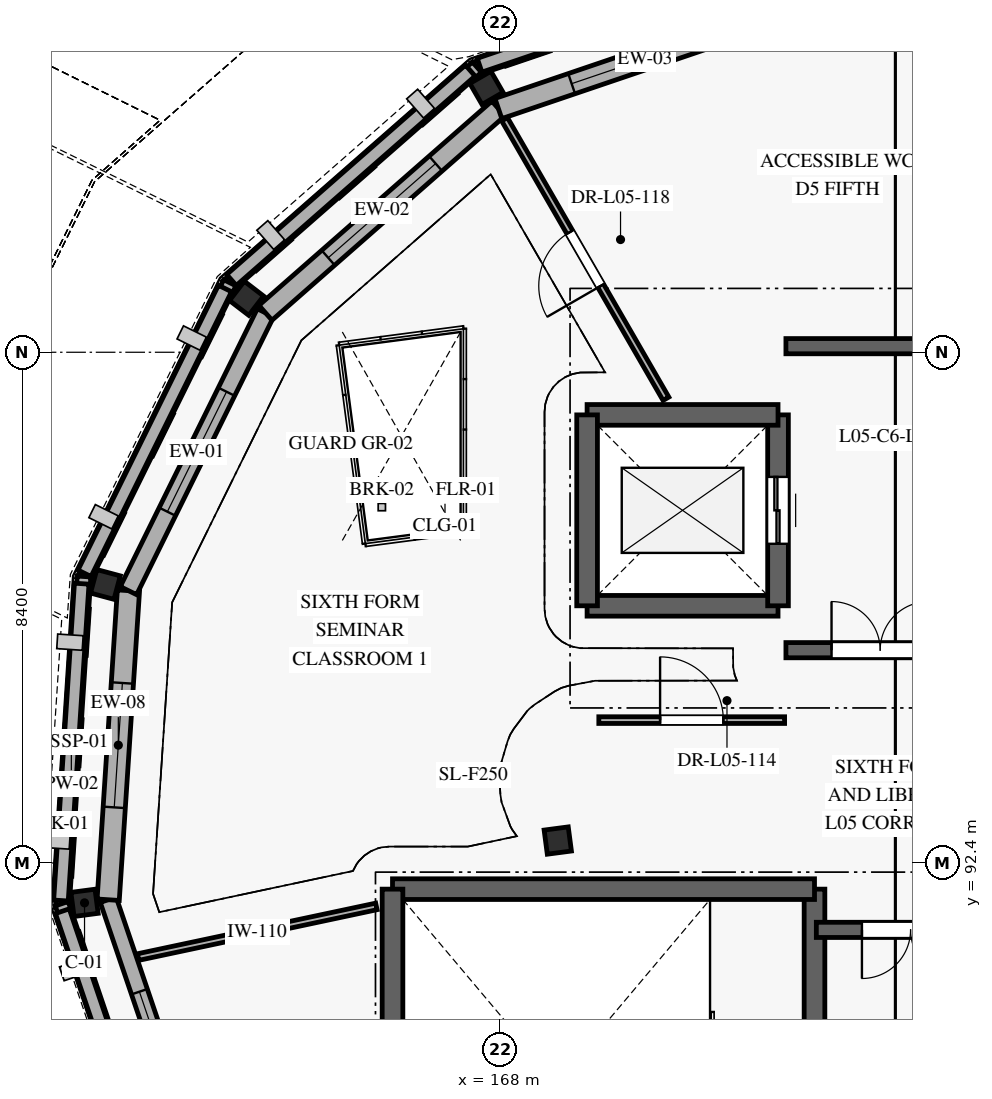
"""IFC4 building model, lengths in metres.
Left out: names, types, materials, properties, quantities, classifications, styles, units other than length and angle.
Written with IfcOpenShell. Run it as: python <this file> out.ifc"""

import sys

from ifc_helpers import new_model, si_unit, direction, frame, frame_2d, origin, origin_2d, place, context, subcontext, project, spatial, rectangle, extrude, element, fill, save


model = new_model("IFC4")
c1 = context("Model", 3, precision=1e-05, world=origin(), true_north=direction((0.0, 1.0)))
c2 = subcontext(c1, "Body", "Model", "MODEL_VIEW")
j1 = project(units=[si_unit("LENGTHUNIT", "METRE"), si_unit("PLANEANGLEUNIT", "RADIAN")], contexts=[c1])
p1 = place(None, origin())
s1 = spatial("IfcSite", under=j1, at=p1, CompositionType="ELEMENT")
p2 = place(p1, origin())
s2 = spatial("IfcBuilding", under=s1, at=p2, CompositionType="ELEMENT")
p3 = place(p2, frame((0.0, 0.0, 20.8)))
s3 = spatial("IfcBuildingStorey", under=s2, at=p3, CompositionType="ELEMENT", Elevation=20.8)
for number, where, z_axis, x_axis in (
    (1, (167.775, 105.148, 0.0), (0.0, 0.0, 1.0), (-0.866, -0.5, 0.0)),
    (2, (163.829, 101.688, 0.0), (0.0, 0.0, 1.0), (-0.609, -0.793, 0.0)),
    (3, (161.508, 96.981, 0.0), (0.0, 0.0, 1.0), (-0.259, -0.966, 0.0)),
    (4, (161.165, 91.744, 0.0), (0.0, 0.0, 1.0), (0.131, -0.991, 0.0)),
    (5, (168.948, 92.769, 0.0), (0.0, 0.0, 1.0), (-0.991, -0.131, 0.0)),
):
    element("IfcColumn", number, at=place(p3, frame(where, z_axis=z_axis, x_axis=x_axis)), inside=s3, PredefinedType="COLUMN", context=c2, shape_type="SweptSolid", body=[
        extrude(rectangle(XDim=0.4, YDim=0.4, at=origin_2d()), origin(), (0.0, 0.0, 1.0), 4.0),
    ])
p4 = place(p3, frame((163.192, 86.971, 0.0), z_axis=(0.0, 0.0, 1.0), x_axis=(-0.321398403796, 0.946944067006, 0.0)))
e6 = element("IfcWall", 6, at=p4, inside=s3, PredefinedType="SOLIDWALL", context=c2, shape_type="SweptSolid", body=[
    extrude(rectangle(XDim=5.095, YDim=0.275, at=frame_2d((2.547, 0.0))), origin(), (0.0, 0.0, 1.0), 3.74),
])
p5 = place(p4, frame((1.597, 0.0, 0.85)))
e7 = element("IfcOpeningElement", 7, at=p5, cuts=e6, PredefinedType="OPENING", context=c2, shape_type="SweptSolid", body=[
    extrude(rectangle(XDim=1.9, YDim=1.8, at=frame_2d((0.95, 0.9))), frame((0.0, 0.147, 0.0), z_axis=(0.0, -1.0, 0.0), x_axis=(1.0, 0.0, 0.0)), (0.0, 0.0, 1.0), 0.295),
])
p6 = place(p3, frame((161.554, 91.796, 0.0), z_axis=(0.0, 0.0, 1.0), x_axis=(0.065364406289, 0.99786146052, 0.0)))
e8 = element("IfcWall", 8, at=p6, inside=s3, PredefinedType="SOLIDWALL", context=c2, shape_type="SweptSolid", body=[
    extrude(rectangle(XDim=5.095, YDim=0.365, at=frame_2d((2.547, 0.0))), origin(), (0.0, 0.0, 1.0), 3.74),
])
p7 = place(p6, frame((1.522, 0.0, 0.85)))
e9 = element("IfcOpeningElement", 9, at=p7, cuts=e8, PredefinedType="OPENING", context=c2, shape_type="SweptSolid", body=[
    extrude(rectangle(XDim=2.05, YDim=1.8, at=frame_2d((1.025, 0.9))), frame((0.0, 0.192, 0.0), z_axis=(0.0, -1.0, 0.0), x_axis=(1.0, 0.0, 0.0)), (0.0, 0.0, 1.0), 0.385),
])
p8 = place(p3, frame((161.887, 96.879, 0.0), z_axis=(0.0, 0.0, 1.0), x_axis=(0.442261861213, 0.896885971635, 0.0)))
e10 = element("IfcWall", 10, at=p8, inside=s3, PredefinedType="SOLIDWALL", context=c2, shape_type="SweptSolid", body=[
    extrude(rectangle(XDim=5.095, YDim=0.3, at=frame_2d((2.548, 0.0))), origin(), (0.0, 0.0, 1.0), 3.74),
])
p9 = place(p8, frame((1.448, 0.0, 0.85)))
e11 = element("IfcOpeningElement", 11, at=p9, cuts=e10, PredefinedType="OPENING", context=c2, shape_type="SweptSolid", body=[
    extrude(rectangle(XDim=2.2, YDim=1.8, at=frame_2d((1.1, 0.9))), frame((0.0, 0.16, 0.0), z_axis=(0.0, -1.0, 0.0), x_axis=(1.0, 0.0, 0.0)), (0.0, 0.0, 1.0), 0.32),
])
p10 = place(p3, frame((164.141, 101.449, 0.0), z_axis=(0.0, 0.0, 1.0), x_axis=(0.751857877577, 0.659325209533, 0.0)))
e12 = element("IfcWall", 12, at=p10, inside=s3, PredefinedType="SOLIDWALL", context=c2, shape_type="SweptSolid", body=[
    extrude(rectangle(XDim=5.095, YDim=0.325, at=frame_2d((2.547, 0.0))), origin(), (0.0, 0.0, 1.0), 3.74),
])
p11 = place(p10, frame((1.372, 0.0, 0.85)))
e13 = element("IfcOpeningElement", 13, at=p11, cuts=e12, PredefinedType="OPENING", context=c2, shape_type="SweptSolid", body=[
    extrude(rectangle(XDim=2.35, YDim=1.8, at=frame_2d((1.175, 0.9))), frame((0.0, 0.172, 0.0), z_axis=(0.0, -1.0, 0.0), x_axis=(1.0, 0.0, 0.0)), (0.0, 0.0, 1.0), 0.345),
])
p12 = place(p3, frame((167.971, 104.808, 0.0), z_axis=(0.0, 0.0, 1.0), x_axis=(0.946944067006, 0.321398403796, 0.0)))
e14 = element("IfcWall", 14, at=p12, inside=s3, PredefinedType="SOLIDWALL", context=c2, shape_type="SweptSolid", body=[
    extrude(rectangle(XDim=5.095, YDim=0.35, at=frame_2d((2.547, 0.0))), origin(), (0.0, 0.0, 1.0), 3.74),
])
p13 = place(p12, frame((1.272, 0.0, 0.85)))
e15 = element("IfcOpeningElement", 15, at=p13, cuts=e14, PredefinedType="OPENING", context=c2, shape_type="SweptSolid", body=[
    extrude(rectangle(XDim=2.55, YDim=1.8, at=frame_2d((1.275, 0.9))), frame((0.0, 0.185, 0.0), z_axis=(0.0, -1.0, 0.0), x_axis=(1.0, 0.0, 0.0)), (0.0, 0.0, 1.0), 0.37),
])
p14 = place(p3, frame((172.73, 107.21, 0.0), z_axis=(0.0, 0.0, 1.0), x_axis=(-0.946943969259, -0.321398691789, 0.0)))
e16 = element("IfcWall", 16, at=p14, inside=s3, PredefinedType="ELEMENTEDWALL", context=c2, shape_type="SweptSolid", body=[
    extrude(rectangle(XDim=5.462, YDim=0.225, at=frame_2d((2.731, 0.0))), origin(), (0.0, 0.0, 1.0), 1.09),
])
p15 = place(p3, frame((168.78, 105.869, 1.09), z_axis=(0.0, 0.0, 1.0), x_axis=(-0.946868666253, -0.321620473335, 0.0)))
e17 = element("IfcWall", 17, at=p15, inside=s3, PredefinedType="ELEMENTEDWALL", context=c2, shape_type="SweptSolid", body=[
    extrude(rectangle(XDim=0.76, YDim=0.245, at=frame_2d((0.38, 0.0))), origin(), (0.0, 0.0, 1.0), 2.65),
])
p16 = place(p3, frame((167.619, 105.489, 0.0), z_axis=(0.0, 0.0, 1.0), x_axis=(-0.751850842434, -0.659333231933, 0.0)))
e18 = element("IfcWall", 18, at=p16, inside=s3, PredefinedType="ELEMENTEDWALL", context=c2, shape_type="SweptSolid", body=[
    extrude(rectangle(XDim=5.462, YDim=0.225, at=frame_2d((2.731, 0.0))), origin(), (0.0, 0.0, 1.0), 1.09),
])
p17 = place(p3, frame((167.22, 105.139, 1.09), z_axis=(0.0, 0.0, 1.0), x_axis=(-0.751840109951, -0.659345470196, 0.0)))
e19 = element("IfcWall", 19, at=p17, inside=s3, PredefinedType="ELEMENTEDWALL", context=c2, shape_type="SweptSolid", body=[
    extrude(rectangle(XDim=0.76, YDim=0.245, at=frame_2d((0.38, 0.0))), origin(), (0.0, 0.0, 1.0), 2.65),
])
p18 = place(p3, frame((165.851, 103.939, 1.09), z_axis=(0.0, 0.0, 1.0), x_axis=(-0.751859704857, -0.659323125798, 0.0)))
e20 = element("IfcWall", 20, at=p18, inside=s3, PredefinedType="ELEMENTEDWALL", context=c2, shape_type="SweptSolid", body=[
    extrude(rectangle(XDim=0.76, YDim=0.245, at=frame_2d((0.38, 0.0))), origin(), (0.0, 0.0, 1.0), 2.65),
])
p19 = place(p3, frame((164.482, 102.738, 1.09), z_axis=(0.0, 0.0, 1.0), x_axis=(-0.751700438565, -0.659504701015, 0.0)))
e21 = element("IfcWall", 21, at=p19, inside=s3, PredefinedType="ELEMENTEDWALL", context=c2, shape_type="SweptSolid", body=[
    extrude(rectangle(XDim=0.76, YDim=0.245, at=frame_2d((0.38, 0.0))), origin(), (0.0, 0.0, 1.0), 2.65),
])
p20 = place(p3, frame((163.554, 101.943, 0.0), z_axis=(0.0, 0.0, 1.0), x_axis=(-0.442290514216, -0.896871842035, 0.0)))
e22 = element("IfcWall", 22, at=p20, inside=s3, PredefinedType="ELEMENTEDWALL", context=c2, shape_type="SweptSolid", body=[
    extrude(rectangle(XDim=5.462, YDim=0.225, at=frame_2d((2.731, 0.0))), origin(), (0.0, 0.0, 1.0), 1.09),
])
p21 = place(p3, frame((163.32, 101.467, 1.09), z_axis=(0.0, 0.0, 1.0), x_axis=(-0.442451801258, -0.896792285629, 0.0)))
e23 = element("IfcWall", 23, at=p21, inside=s3, PredefinedType="ELEMENTEDWALL", context=c2, shape_type="SweptSolid", body=[
    extrude(rectangle(XDim=0.76, YDim=0.245, at=frame_2d((0.38, 0.0))), origin(), (0.0, 0.0, 1.0), 2.65),
])
for number, where, z_axis, x_axis in (
    (24, (162.514, 99.834, 1.09), (0.0, 0.0, 1.0), (-0.442, -0.897, 0.0)),
    (25, (161.709, 98.201, 1.09), (0.0, 0.0, 1.0), (-0.442, -0.897, 0.0)),
):
    element("IfcWall", number, at=place(p3, frame(where, z_axis=z_axis, x_axis=x_axis)), inside=s3, PredefinedType="ELEMENTEDWALL", context=c2, shape_type="SweptSolid", body=[
        extrude(rectangle(XDim=0.76, YDim=0.245, at=frame_2d((0.38, 0.0))), origin(), (0.0, 0.0, 1.0), 2.65),
    ])
p22 = place(p3, frame((161.156, 97.112, 0.0), z_axis=(0.0, 0.0, 1.0), x_axis=(-0.065385822726, -0.997860057416, 0.0)))
e26 = element("IfcWall", 26, at=p22, inside=s3, PredefinedType="ELEMENTEDWALL", context=c2, shape_type="SweptSolid", body=[
    extrude(rectangle(XDim=5.463, YDim=0.225, at=frame_2d((2.731, 0.0))), origin(), (0.0, 0.0, 1.0), 1.09),
])
p23 = place(p3, frame((161.122, 96.583, 1.09), z_axis=(0.0, 0.0, 1.0), x_axis=(-0.065197327118, -0.997872390908, 0.0)))
e27 = element("IfcWall", 27, at=p23, inside=s3, PredefinedType="ELEMENTEDWALL", context=c2, shape_type="SweptSolid", body=[
    extrude(rectangle(XDim=0.76, YDim=0.245, at=frame_2d((0.38, 0.0))), origin(), (0.0, 0.0, 1.0), 2.65),
])
for number, where, z_axis, x_axis in (
    (28, (161.003, 94.765, 1.09), (0.0, 0.0, 1.0), (-0.065, -0.998, 0.0)),
    (29, (160.884, 92.948, 1.09), (0.0, 0.0, 1.0), (-0.066, -0.998, 0.0)),
):
    element("IfcWall", number, at=place(p3, frame(where, z_axis=z_axis, x_axis=x_axis)), inside=s3, PredefinedType="ELEMENTEDWALL", context=c2, shape_type="SweptSolid", body=[
        extrude(rectangle(XDim=0.76, YDim=0.245, at=frame_2d((0.38, 0.0))), origin(), (0.0, 0.0, 1.0), 2.65),
    ])
p24 = place(p3, frame((160.79, 91.73, 0.0), z_axis=(0.0, 0.0, 1.0), x_axis=(0.321398691789, -0.946943969259, 0.0)))
e30 = element("IfcWall", 30, at=p24, inside=s3, PredefinedType="ELEMENTEDWALL", context=c2, shape_type="SweptSolid", body=[
    extrude(rectangle(XDim=5.462, YDim=0.225, at=frame_2d((2.731, 0.0))), origin(), (0.0, 0.0, 1.0), 1.09),
])
p25 = place(p3, frame((160.961, 91.228, 1.09), z_axis=(0.0, 0.0, 1.0), x_axis=(0.321522655386, -0.946901886192, 0.0)))
e31 = element("IfcWall", 31, at=p25, inside=s3, PredefinedType="ELEMENTEDWALL", context=c2, shape_type="SweptSolid", body=[
    extrude(rectangle(XDim=0.76, YDim=0.245, at=frame_2d((0.38, 0.0))), origin(), (0.0, 0.0, 1.0), 2.65),
])
p26 = place(p3, frame((172.607, 107.2, 4.0), z_axis=(0.0, 0.0, 1.0), x_axis=(-0.946929922709, -0.321440074474, 0.0)))
e32 = element("IfcWall", 32, at=p26, inside=s3, PredefinedType="PARAPET", context=c2, shape_type="SweptSolid", body=[
    extrude(rectangle(XDim=5.222, YDim=0.24, at=frame_2d((2.611, 0.0))), origin(), (0.0, 0.0, 1.0), 1.12),
])
p27 = place(p3, frame((167.509, 105.433, 4.0), z_axis=(0.0, 0.0, 1.0), x_axis=(-0.751826191912, -0.659361340355, 0.0)))
e33 = element("IfcWall", 33, at=p27, inside=s3, PredefinedType="PARAPET", context=c2, shape_type="SweptSolid", body=[
    extrude(rectangle(XDim=5.223, YDim=0.24, at=frame_2d((2.611, 0.0))), origin(), (0.0, 0.0, 1.0), 1.12),
])
p28 = place(p3, frame((163.475, 101.849, 4.0), z_axis=(0.0, 0.0, 1.0), x_axis=(-0.442326480827, -0.896854104277, 0.0)))
e34 = element("IfcWall", 34, at=p28, inside=s3, PredefinedType="PARAPET", context=c2, shape_type="SweptSolid", body=[
    extrude(rectangle(XDim=5.222, YDim=0.24, at=frame_2d((2.611, 0.0))), origin(), (0.0, 0.0, 1.0), 1.12),
])
p29 = place(p3, frame((161.119, 96.994, 4.0), z_axis=(0.0, 0.0, 1.0), x_axis=(-0.065398904758, -0.997859200116, 0.0)))
e35 = element("IfcWall", 35, at=p29, inside=s3, PredefinedType="PARAPET", context=c2, shape_type="SweptSolid", body=[
    extrude(rectangle(XDim=5.223, YDim=0.24, at=frame_2d((2.611, 0.0))), origin(), (0.0, 0.0, 1.0), 1.12),
])
p30 = place(p3, frame((160.8, 91.607, 4.0), z_axis=(0.0, 0.0, 1.0), x_axis=(0.321440074474, -0.946929922709, 0.0)))
e36 = element("IfcWall", 36, at=p30, inside=s3, PredefinedType="PARAPET", context=c2, shape_type="SweptSolid", body=[
    extrude(rectangle(XDim=5.222, YDim=0.24, at=frame_2d((2.611, 0.0))), origin(), (0.0, 0.0, 1.0), 1.12),
])
p31 = place(p3, frame((173.17, 85.63, 0.0), z_axis=(0.0, 0.0, 1.0), x_axis=(0.0, 1.0, 0.0)))
e37 = element("IfcWall", 37, at=p31, inside=s3, PredefinedType="SHEAR", context=c2, shape_type="SweptSolid", body=[
    extrude(rectangle(XDim=6.34, YDim=0.34, at=frame_2d((3.17, 0.0))), origin(), (0.0, 0.0, 1.0), 3.75),
])
p32 = place(p31, frame((2.57, 0.0, 0.0)))
e38 = element("IfcOpeningElement", 38, at=p32, cuts=e37, PredefinedType="OPENING", context=c2, shape_type="SweptSolid", body=[
    extrude(rectangle(XDim=1.2, YDim=2.1, at=frame_2d((0.6, 1.05))), frame((0.0, 0.18, 0.0), z_axis=(0.0, -1.0, 0.0), x_axis=(1.0, 0.0, 0.0)), (0.0, 0.0, 1.0), 0.36),
])
p33 = place(p3, frame((173.17, 91.97, 0.0), z_axis=(0.0, 0.0, 1.0), x_axis=(-1.0, 0.0, 0.0)))
e39 = element("IfcWall", 39, at=p33, inside=s3, PredefinedType="SHEAR", context=c2, shape_type="SweptSolid", body=[
    extrude(rectangle(XDim=6.94, YDim=0.34, at=frame_2d((3.47, 0.0))), origin(), (0.0, 0.0, 1.0), 3.75),
])
p34 = place(p3, frame((166.23, 91.97, 0.0), z_axis=(0.0, 0.0, 1.0), x_axis=(0.0, -1.0, 0.0)))
e40 = element("IfcWall", 40, at=p34, inside=s3, PredefinedType="SHEAR", context=c2, shape_type="SweptSolid", body=[
    extrude(rectangle(XDim=6.34, YDim=0.34, at=frame_2d((3.17, 0.0))), origin(), (0.0, 0.0, 1.0), 3.75),
])
p35 = place(p3, frame((176.3, 91.3, 0.0), z_axis=(0.0, 0.0, 1.0), x_axis=(-1.0, 0.0, 0.0)))
e41 = element("IfcWall", 41, at=p35, inside=s3, PredefinedType="SHEAR", context=c2, shape_type="SweptSolid", body=[
    extrude(rectangle(XDim=3.1, YDim=0.25, at=frame_2d((1.55, 0.0))), origin(), (0.0, 0.0, 1.0), 3.75),
])
p36 = place(p35, frame((0.75, 0.0, 0.0)))
e42 = element("IfcOpeningElement", 42, at=p36, cuts=e41, PredefinedType="OPENING", context=c2, shape_type="SweptSolid", body=[
    extrude(rectangle(XDim=1.6, YDim=2.15, at=frame_2d((0.8, 1.075))), frame((0.0, 0.135, 0.0), z_axis=(0.0, -1.0, 0.0), x_axis=(1.0, 0.0, 0.0)), (0.0, 0.0, 1.0), 0.27),
])
p37 = place(p3, frame((169.43, 96.63, 0.0), z_axis=(0.0, 0.0, 1.0), x_axis=(1.0, 0.0, 0.0)))
e43 = element("IfcWall", 43, at=p37, inside=s3, PredefinedType="SHEAR", context=c2, shape_type="SweptSolid", body=[
    extrude(rectangle(XDim=3.14, YDim=0.34, at=frame_2d((1.57, 0.0))), origin(), (0.0, 0.0, 1.0), 3.75),
])
p38 = place(p3, frame((172.57, 96.63, 0.0), z_axis=(0.0, 0.0, 1.0), x_axis=(0.0, 1.0, 0.0)))
e44 = element("IfcWall", 44, at=p38, inside=s3, PredefinedType="SHEAR", context=c2, shape_type="SweptSolid", body=[
    extrude(rectangle(XDim=3.14, YDim=0.34, at=frame_2d((1.57, 0.0))), origin(), (0.0, 0.0, 1.0), 3.75),
])
p39 = place(p38, frame((1.02, 0.0, 0.0)))
e45 = element("IfcOpeningElement", 45, at=p39, cuts=e44, PredefinedType="OPENING", context=c2, shape_type="SweptSolid", body=[
    extrude(rectangle(XDim=1.1, YDim=2.1, at=frame_2d((0.55, 1.05))), frame((0.0, 0.18, 0.0), z_axis=(0.0, -1.0, 0.0), x_axis=(1.0, 0.0, 0.0)), (0.0, 0.0, 1.0), 0.36),
])
for number, where, z_axis, x_axis in (
    (46, (172.57, 99.77, 0.0), (0.0, 0.0, 1.0), (-1.0, 0.0, 0.0)),
    (47, (169.43, 99.77, 0.0), (0.0, 0.0, 1.0), (0.0, -1.0, 0.0)),
):
    element("IfcWall", number, at=place(p3, frame(where, z_axis=z_axis, x_axis=x_axis)), inside=s3, PredefinedType="SHEAR", context=c2, shape_type="SweptSolid", body=[
        extrude(rectangle(XDim=3.14, YDim=0.34, at=frame_2d((1.57, 0.0))), origin(), (0.0, 0.0, 1.0), 3.75),
    ])
p40 = place(p3, frame((172.7, 95.9, 0.0), z_axis=(0.0, 0.0, 1.0), x_axis=(1.0, 0.0, 0.0)))
e48 = element("IfcWall", 48, at=p40, inside=s3, PredefinedType="SHEAR", context=c2, shape_type="SweptSolid", body=[
    extrude(rectangle(XDim=3.1, YDim=0.25, at=frame_2d((1.55, 0.0))), origin(), (0.0, 0.0, 1.0), 3.75),
])
p41 = place(p40, frame((0.75, 0.0, 0.0)))
e49 = element("IfcOpeningElement", 49, at=p41, cuts=e48, PredefinedType="OPENING", context=c2, shape_type="SweptSolid", body=[
    extrude(rectangle(XDim=1.6, YDim=2.15, at=frame_2d((0.8, 1.075))), frame((0.0, 0.135, 0.0), z_axis=(0.0, -1.0, 0.0), x_axis=(1.0, 0.0, 0.0)), (0.0, 0.0, 1.0), 0.27),
])
p42 = place(p3, frame((175.8, 100.9, 0.0), z_axis=(0.0, 0.0, 1.0), x_axis=(-1.0, 0.0, 0.0)))
e50 = element("IfcWall", 50, at=p42, inside=s3, PredefinedType="SHEAR", context=c2, shape_type="SweptSolid", body=[
    extrude(rectangle(XDim=3.1, YDim=0.25, at=frame_2d((1.55, 0.0))), origin(), (0.0, 0.0, 1.0), 3.75),
])
p43 = place(p3, frame((169.623, 94.75, 0.0), z_axis=(0.0, 0.0, 1.0), x_axis=(1.0, 0.0, 0.0)))
e51 = element("IfcWall", 51, at=p43, inside=s3, PredefinedType="PARTITIONING", context=c2, shape_type="SweptSolid", body=[
    extrude(rectangle(XDim=3.055, YDim=0.11, at=frame_2d((1.527, 0.0))), origin(), (0.0, 0.0, 1.0), 3.75),
])
p44 = place(p43, frame((1.008, 0.0, 0.0)))
e52 = element("IfcOpeningElement", 52, at=p44, cuts=e51, PredefinedType="OPENING", context=c2, shape_type="SweptSolid", body=[
    extrude(rectangle(XDim=1.04, YDim=2.1, at=frame_2d((0.52, 1.05))), frame((0.0, 0.065, 0.0), z_axis=(0.0, -1.0, 0.0), x_axis=(1.0, 0.0, 0.0)), (0.0, 0.0, 1.0), 0.13),
])
p45 = place(p3, frame((170.727, 100.035, 0.0), z_axis=(0.0, 0.0, 1.0), x_axis=(-0.500022392924, 0.866012474838, 0.0)))
e53 = element("IfcWall", 53, at=p45, inside=s3, PredefinedType="PARTITIONING", context=c2, shape_type="SweptSolid", body=[
    extrude(rectangle(XDim=5.308, YDim=0.11, at=frame_2d((2.654, 0.0))), origin(), (0.0, 0.0, 1.0), 3.75),
])
p46 = place(p45, frame((2.144, 0.0, 0.0)))
e54 = element("IfcOpeningElement", 54, at=p46, cuts=e53, PredefinedType="OPENING", context=c2, shape_type="SweptSolid", body=[
    extrude(rectangle(XDim=1.02, YDim=2.06, at=frame_2d((0.51, 1.03))), frame((0.0, 0.065, 0.0), z_axis=(0.0, -1.0, 0.0), x_axis=(1.0, 0.0, 0.0)), (0.0, 0.0, 1.0), 0.13),
])
p47 = place(p3, frame((162.046, 90.853, 0.0), z_axis=(0.0, 0.0, 1.0), x_axis=(0.978149713283, 0.207901751805, 0.0)))
e55 = element("IfcWall", 55, at=p47, inside=s3, PredefinedType="PARTITIONING", context=c2, shape_type="SweptSolid", body=[
    extrude(rectangle(XDim=4.007, YDim=0.11, at=frame_2d((2.003, 0.0))), origin(), (0.0, 0.0, 1.0), 3.75),
])
p48 = place(p5, origin())
e56 = element("IfcWindow", 56, at=p48, inside=s3, PartitioningType="SINGLE_PANEL", PredefinedType="WINDOW", context=c2, shape_type="SweptSolid", body=[
    extrude(rectangle(XDim=1.9, YDim=1.8, at=frame_2d((0.95, 0.9))), frame((0.0, 0.03, 0.0), z_axis=(0.0, -1.0, 0.0), x_axis=(1.0, 0.0, 0.0)), (0.0, 0.0, 1.0), 0.06),
])
fill(e7, e56)
p49 = place(p7, origin())
e57 = element("IfcWindow", 57, at=p49, inside=s3, PartitioningType="SINGLE_PANEL", PredefinedType="WINDOW", context=c2, shape_type="SweptSolid", body=[
    extrude(rectangle(XDim=2.05, YDim=1.8, at=frame_2d((1.025, 0.9))), frame((0.0, 0.03, 0.0), z_axis=(0.0, -1.0, 0.0), x_axis=(1.0, 0.0, 0.0)), (0.0, 0.0, 1.0), 0.06),
])
fill(e9, e57)
p50 = place(p9, origin())
e58 = element("IfcWindow", 58, at=p50, inside=s3, PartitioningType="SINGLE_PANEL", PredefinedType="WINDOW", context=c2, shape_type="SweptSolid", body=[
    extrude(rectangle(XDim=2.2, YDim=1.8, at=frame_2d((1.1, 0.9))), frame((0.0, 0.03, 0.0), z_axis=(0.0, -1.0, 0.0), x_axis=(1.0, 0.0, 0.0)), (0.0, 0.0, 1.0), 0.06),
])
fill(e11, e58)
p51 = place(p11, origin())
e59 = element("IfcWindow", 59, at=p51, inside=s3, PartitioningType="SINGLE_PANEL", PredefinedType="WINDOW", context=c2, shape_type="SweptSolid", body=[
    extrude(rectangle(XDim=2.35, YDim=1.8, at=frame_2d((1.175, 0.9))), frame((0.0, 0.03, 0.0), z_axis=(0.0, -1.0, 0.0), x_axis=(1.0, 0.0, 0.0)), (0.0, 0.0, 1.0), 0.06),
])
fill(e13, e59)
p52 = place(p13, origin())
e60 = element("IfcWindow", 60, at=p52, inside=s3, PartitioningType="SINGLE_PANEL", PredefinedType="WINDOW", context=c2, shape_type="SweptSolid", body=[
    extrude(rectangle(XDim=2.55, YDim=1.8, at=frame_2d((1.275, 0.9))), frame((0.0, 0.03, 0.0), z_axis=(0.0, -1.0, 0.0), x_axis=(1.0, 0.0, 0.0)), (0.0, 0.0, 1.0), 0.06),
])
fill(e15, e60)
p53 = place(p36, origin())
e61 = element("IfcDoor", 61, at=p53, inside=s3, OperationType="DOUBLE_DOOR_SINGLE_SWING", PredefinedType="DOOR", context=c2, shape_type="SweptSolid", body=[
    extrude(rectangle(XDim=1.6, YDim=2.15, at=frame_2d((0.8, 1.075))), frame((0.0, 0.025, 0.0), z_axis=(0.0, -1.0, 0.0), x_axis=(1.0, 0.0, 0.0)), (0.0, 0.0, 1.0), 0.05),
])
fill(e42, e61)
p54 = place(p39, frame((1.1, 0.0, 0.0), z_axis=(0.0, 0.0, 1.0), x_axis=(-1.0, 0.0, 0.0)))
e62 = element("IfcDoor", 62, at=p54, inside=s3, OperationType="DOUBLE_DOOR_SLIDING", PredefinedType="DOOR", context=c2, shape_type="SweptSolid", body=[
    extrude(rectangle(XDim=1.1, YDim=2.1, at=frame_2d((0.55, 1.05))), frame((0.0, 0.025, 0.0), z_axis=(0.0, -1.0, 0.0), x_axis=(1.0, 0.0, 0.0)), (0.0, 0.0, 1.0), 0.05),
])
fill(e45, e62)
p55 = place(p41, origin())
e63 = element("IfcDoor", 63, at=p55, inside=s3, OperationType="DOUBLE_DOOR_SINGLE_SWING", PredefinedType="DOOR", context=c2, shape_type="SweptSolid", body=[
    extrude(rectangle(XDim=1.6, YDim=2.15, at=frame_2d((0.8, 1.075))), frame((0.0, 0.025, 0.0), z_axis=(0.0, -1.0, 0.0), x_axis=(1.0, 0.0, 0.0)), (0.0, 0.0, 1.0), 0.05),
])
fill(e49, e63)
p56 = place(p44, origin())
e64 = element("IfcDoor", 64, at=p56, inside=s3, OperationType="SINGLE_SWING_LEFT", PredefinedType="DOOR", context=c2, shape_type="SweptSolid", body=[
    extrude(rectangle(XDim=1.04, YDim=2.1, at=frame_2d((0.52, 1.05))), frame((0.0, 0.025, 0.0), z_axis=(0.0, -1.0, 0.0), x_axis=(1.0, 0.0, 0.0)), (0.0, 0.0, 1.0), 0.05),
])
fill(e52, e64)
p57 = place(p46, origin())
e65 = element("IfcDoor", 65, at=p57, inside=s3, OperationType="SINGLE_SWING_LEFT", PredefinedType="DOOR", context=c2, shape_type="SweptSolid", body=[
    extrude(rectangle(XDim=1.02, YDim=2.06, at=frame_2d((0.51, 1.03))), frame((0.0, 0.025, 0.0), z_axis=(0.0, -1.0, 0.0), x_axis=(1.0, 0.0, 0.0)), (0.0, 0.0, 1.0), 0.05),
])
fill(e54, e65)
save(model, sys.argv[1])
